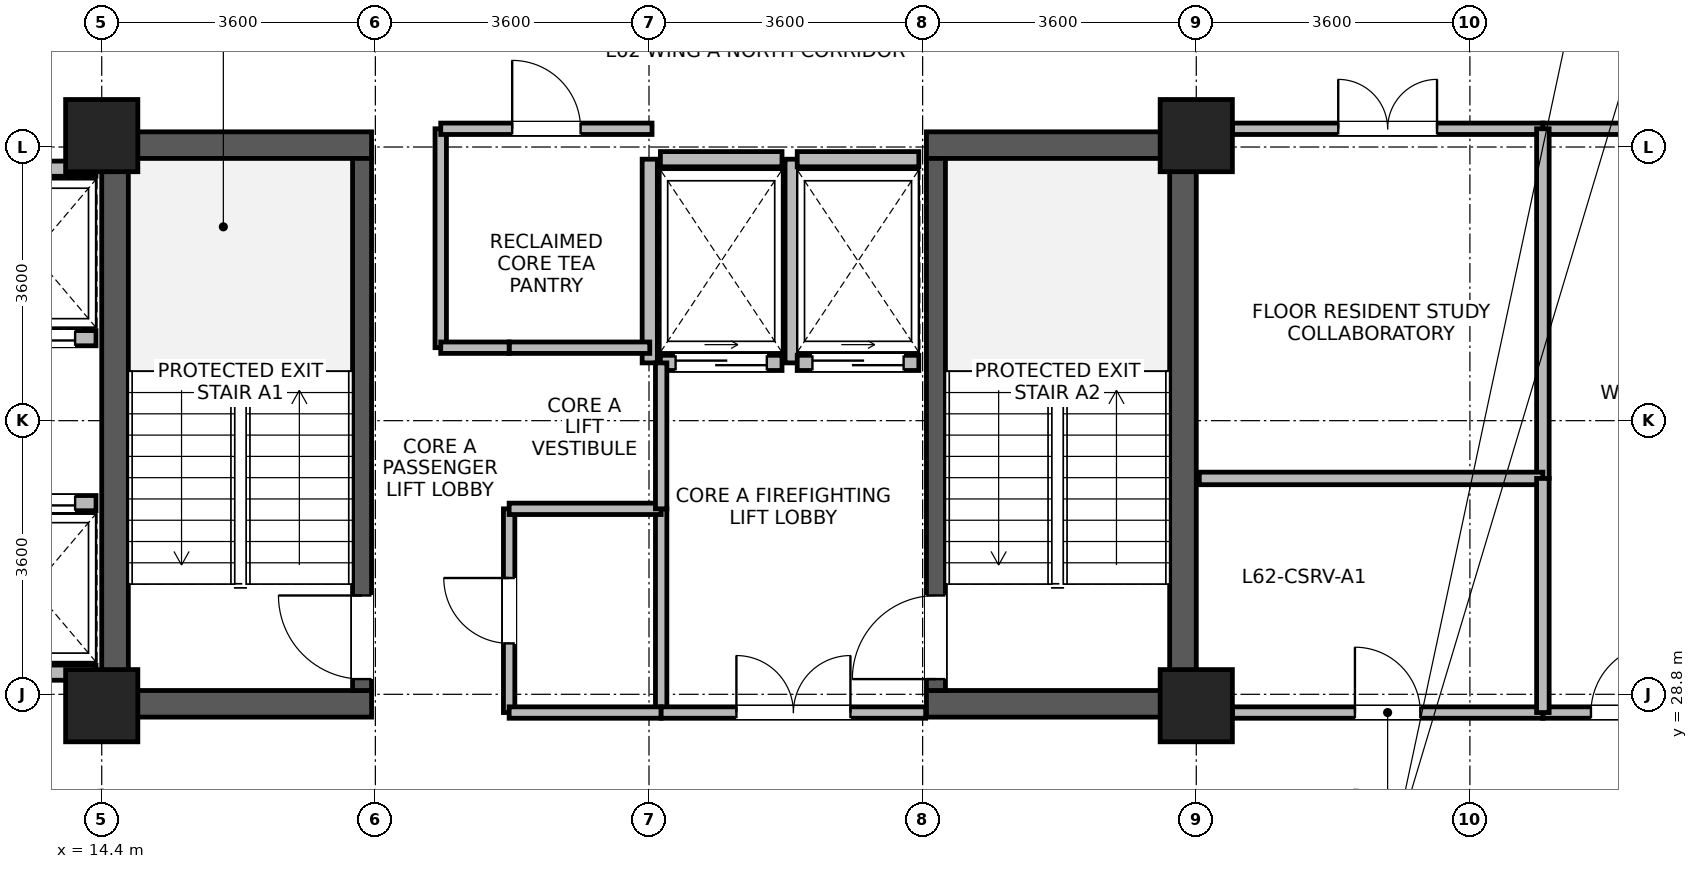
"""IFC4 building model, lengths in metres.
Left out: names, types, materials, properties, quantities, classifications, styles, units other than length and angle.
Written with IfcOpenShell. Run it as: python <this file> out.ifc"""

import sys

from ifc_helpers import new_model, si_unit, direction, frame, frame_2d, origin, origin_2d, place, context, subcontext, project, spatial, rectangle, extrude, source, transform, mapped, element, fill, save


model = new_model("IFC4")
c1 = context("Model", 3, precision=1e-05, world=origin(), true_north=direction((0.0, 1.0)))
c2 = subcontext(c1, "Body", "Model", "MODEL_VIEW")
j1 = project(units=[si_unit("LENGTHUNIT", "METRE"), si_unit("PLANEANGLEUNIT", "RADIAN")], contexts=[c1])
p1 = place(None, origin())
s1 = spatial("IfcSite", under=j1, at=p1, CompositionType="ELEMENT")
p2 = place(p1, origin())
s2 = spatial("IfcBuilding", under=s1, at=p2, CompositionType="ELEMENT")
p3 = place(p2, frame((0.0, 0.0, 242.5)))
s3 = spatial("IfcBuildingStorey", under=s2, at=p3, CompositionType="ELEMENT", Elevation=242.5)
for number, where, z_axis, x_axis in (
    (1, (14.575, 28.5, 0.0), (0.0, 0.0, 1.0), (0.0, 1.0, 0.0)),
    (2, (28.625, 28.5, 0.0), (0.0, 0.0, 1.0), (0.0, 1.0, 0.0)),
):
    element("IfcWall", number, at=place(p3, frame(where, z_axis=z_axis, x_axis=x_axis)), inside=s3, PredefinedType="SHEAR", context=c2, shape_type="SweptSolid", body=[
        extrude(rectangle(XDim=7.7, YDim=0.35, at=frame_2d((3.85, 0.0))), origin(), (0.0, 0.0, 1.0), 3.44),
    ])
for number, where, z_axis, x_axis in (
    (3, (14.75, 28.675, 0.0), (0.0, 0.0, 1.0), (1.0, 0.0, 0.0)),
    (4, (25.25, 28.675, 0.0), (0.0, 0.0, 1.0), (1.0, 0.0, 0.0)),
    (5, (14.75, 36.025, 0.0), (0.0, 0.0, 1.0), (1.0, 0.0, 0.0)),
    (6, (25.25, 36.025, 0.0), (0.0, 0.0, 1.0), (1.0, 0.0, 0.0)),
):
    element("IfcWall", number, at=place(p3, frame(where, z_axis=z_axis, x_axis=x_axis)), inside=s3, PredefinedType="SHEAR", context=c2, shape_type="SweptSolid", body=[
        extrude(rectangle(XDim=3.2, YDim=0.35, at=frame_2d((1.6, 0.0))), origin(), (0.0, 0.0, 1.0), 3.44),
    ])
p4 = place(p3, frame((17.825, 28.85, 0.0), z_axis=(0.0, 0.0, 1.0), x_axis=(0.0, 1.0, 0.0)))
e7 = element("IfcWall", 7, at=p4, inside=s3, PredefinedType="SHEAR", context=c2, shape_type="SweptSolid", body=[
    extrude(rectangle(XDim=7.0, YDim=0.25, at=frame_2d((3.5, 0.0))), origin(), (0.0, 0.0, 1.0), 3.44),
])
p5 = place(p4, frame((0.15, 0.0, 0.0)))
e8 = element("IfcOpeningElement", 8, at=p5, cuts=e7, PredefinedType="OPENING", context=c2, shape_type="SweptSolid", body=[
    extrude(rectangle(XDim=1.1, YDim=2.08, at=frame_2d((0.55, 1.04))), frame((0.0, 0.135, 0.0), z_axis=(0.0, -1.0, 0.0), x_axis=(1.0, 0.0, 0.0)), (0.0, 0.0, 1.0), 0.27),
])
p6 = place(p3, frame((25.375, 28.85, 0.0), z_axis=(0.0, 0.0, 1.0), x_axis=(0.0, 1.0, 0.0)))
e9 = element("IfcWall", 9, at=p6, inside=s3, PredefinedType="SHEAR", context=c2, shape_type="SweptSolid", body=[
    extrude(rectangle(XDim=7.0, YDim=0.25, at=frame_2d((3.5, 0.0))), origin(), (0.0, 0.0, 1.0), 3.44),
])
p7 = place(p6, frame((0.15, 0.0, 0.0)))
e10 = element("IfcOpeningElement", 10, at=p7, cuts=e9, PredefinedType="OPENING", context=c2, shape_type="SweptSolid", body=[
    extrude(rectangle(XDim=1.1, YDim=2.08, at=frame_2d((0.55, 1.04))), frame((0.0, 0.135, 0.0), z_axis=(0.0, -1.0, 0.0), x_axis=(1.0, 0.0, 0.0)), (0.0, 0.0, 1.0), 0.27),
])
m1 = source(origin(), c2, "Body", "SweptSolid", [
    extrude(rectangle(XDim=0.95, YDim=0.95, at=origin_2d()), origin(), (0.0, 0.0, 1.0), 3.7),
])
for number, where, z_axis, x_axis in (
    (11, (14.4, 28.65, 0.0), (0.0, 0.0, 1.0), (1.0, 0.0, 0.0)),
    (12, (14.4, 36.15, 0.0), (0.0, 0.0, 1.0), (1.0, 0.0, 0.0)),
    (13, (28.8, 28.65, 0.0), (0.0, 0.0, 1.0), (1.0, 0.0, 0.0)),
    (14, (28.8, 36.15, 0.0), (0.0, 0.0, 1.0), (1.0, 0.0, 0.0)),
):
    element("IfcColumn", number, at=place(p3, frame(where, z_axis=z_axis, x_axis=x_axis)), inside=s3, PredefinedType="COLUMN", context=c2, shape_type="MappedRepresentation", body=[
        mapped(m1, transform((0.0, 0.0, 0.0), x_axis=(1.0, 0.0, 0.0), y_axis=(0.0, 1.0, 0.0), z_axis=(0.0, 0.0, 1.0), scale=1.0)),
    ])
p8 = place(p3, frame((12.675, 33.485, 0.0), z_axis=(0.0, 0.0, 1.0), x_axis=(1.0, 0.0, 0.0)))
e15 = element("IfcWall", 15, at=p8, inside=s3, PredefinedType="PARTITIONING", context=c2, shape_type="SweptSolid", body=[
    extrude(rectangle(XDim=1.65, YDim=0.2, at=frame_2d((0.825, 0.0))), origin(), (0.0, 0.0, 1.0), 3.42),
])
p9 = place(p8, frame((0.275, 0.0, 0.0)))
e16 = element("IfcOpeningElement", 16, at=p9, cuts=e15, PredefinedType="OPENING", context=c2, shape_type="SweptSolid", body=[
    extrude(rectangle(XDim=1.1, YDim=2.12, at=frame_2d((0.55, 1.06))), frame((0.0, 0.11, 0.0), z_axis=(0.0, -1.0, 0.0), x_axis=(1.0, 0.0, 0.0)), (0.0, 0.0, 1.0), 0.22),
])
for number, where, z_axis, x_axis in (
    (17, (12.675, 35.715, 0.0), (0.0, 0.0, 1.0), (1.0, 0.0, 0.0)),
    (18, (12.675, 29.085, 0.0), (0.0, 0.0, 1.0), (1.0, 0.0, 0.0)),
):
    element("IfcWall", number, at=place(p3, frame(where, z_axis=z_axis, x_axis=x_axis)), inside=s3, PredefinedType="PARTITIONING", context=c2, shape_type="SweptSolid", body=[
        extrude(rectangle(XDim=1.65, YDim=0.2, at=frame_2d((0.825, 0.0))), origin(), (0.0, 0.0, 1.0), 3.42),
    ])
p10 = place(p3, frame((12.675, 31.315, 0.0), z_axis=(0.0, 0.0, 1.0), x_axis=(1.0, 0.0, 0.0)))
e19 = element("IfcWall", 19, at=p10, inside=s3, PredefinedType="PARTITIONING", context=c2, shape_type="SweptSolid", body=[
    extrude(rectangle(XDim=1.65, YDim=0.2, at=frame_2d((0.825, 0.0))), origin(), (0.0, 0.0, 1.0), 3.42),
])
p11 = place(p10, frame((0.275, 0.0, 0.0)))
e20 = element("IfcOpeningElement", 20, at=p11, cuts=e19, PredefinedType="OPENING", context=c2, shape_type="SweptSolid", body=[
    extrude(rectangle(XDim=1.1, YDim=2.12, at=frame_2d((0.55, 1.06))), frame((0.0, 0.11, 0.0), z_axis=(0.0, -1.0, 0.0), x_axis=(1.0, 0.0, 0.0)), (0.0, 0.0, 1.0), 0.22),
])
p12 = place(p3, frame((21.75, 33.16, 0.0), z_axis=(0.0, 0.0, 1.0), x_axis=(1.0, 0.0, 0.0)))
e21 = element("IfcWall", 21, at=p12, inside=s3, PredefinedType="PARTITIONING", context=c2, shape_type="SweptSolid", body=[
    extrude(rectangle(XDim=1.6, YDim=0.2, at=frame_2d((0.8, 0.0))), origin(), (0.0, 0.0, 1.0), 3.42),
])
p13 = place(p12, frame((0.2, 0.0, 0.0)))
e22 = element("IfcOpeningElement", 22, at=p13, cuts=e21, PredefinedType="OPENING", context=c2, shape_type="SweptSolid", body=[
    extrude(rectangle(XDim=1.2, YDim=2.12, at=frame_2d((0.6, 1.06))), frame((0.0, 0.11, 0.0), z_axis=(0.0, -1.0, 0.0), x_axis=(1.0, 0.0, 0.0)), (0.0, 0.0, 1.0), 0.22),
])
p14 = place(p3, frame((21.75, 35.84, 0.0), z_axis=(0.0, 0.0, 1.0), x_axis=(1.0, 0.0, 0.0)))
e23 = element("IfcWall", 23, at=p14, inside=s3, PredefinedType="PARTITIONING", context=c2, shape_type="SweptSolid", body=[
    extrude(rectangle(XDim=1.6, YDim=0.2, at=frame_2d((0.8, 0.0))), origin(), (0.0, 0.0, 1.0), 2.52),
])
for number, where, z_axis, x_axis in (
    (24, (21.61, 33.16, 0.0), (0.0, 0.0, 1.0), (0.0, 1.0, 0.0)),
    (25, (23.49, 33.16, 0.0), (0.0, 0.0, 1.0), (0.0, 1.0, 0.0)),
):
    element("IfcWall", number, at=place(p3, frame(where, z_axis=z_axis, x_axis=x_axis)), inside=s3, PredefinedType="PARTITIONING", context=c2, shape_type="SweptSolid", body=[
        extrude(rectangle(XDim=2.68, YDim=0.2, at=frame_2d((1.34, 0.0))), origin(), (0.0, 0.0, 1.0), 3.42),
    ])
p15 = place(p3, frame((23.55, 33.16, 0.0), z_axis=(0.0, 0.0, 1.0), x_axis=(1.0, 0.0, 0.0)))
e26 = element("IfcWall", 26, at=p15, inside=s3, PredefinedType="PARTITIONING", context=c2, shape_type="SweptSolid", body=[
    extrude(rectangle(XDim=1.6, YDim=0.2, at=frame_2d((0.8, 0.0))), origin(), (0.0, 0.0, 1.0), 3.42),
])
p16 = place(p15, frame((0.2, 0.0, 0.0)))
e27 = element("IfcOpeningElement", 27, at=p16, cuts=e26, PredefinedType="OPENING", context=c2, shape_type="SweptSolid", body=[
    extrude(rectangle(XDim=1.2, YDim=2.12, at=frame_2d((0.6, 1.06))), frame((0.0, 0.11, 0.0), z_axis=(0.0, -1.0, 0.0), x_axis=(1.0, 0.0, 0.0)), (0.0, 0.0, 1.0), 0.22),
])
p17 = place(p3, frame((23.55, 35.84, 0.0), z_axis=(0.0, 0.0, 1.0), x_axis=(1.0, 0.0, 0.0)))
e28 = element("IfcWall", 28, at=p17, inside=s3, PredefinedType="PARTITIONING", context=c2, shape_type="SweptSolid", body=[
    extrude(rectangle(XDim=1.6, YDim=0.2, at=frame_2d((0.8, 0.0))), origin(), (0.0, 0.0, 1.0), 2.52),
])
p18 = place(p3, frame((33.36, 28.56, 0.0), z_axis=(0.0, 0.0, 1.0), x_axis=(1.0, 0.0, 0.0)))
e29 = element("IfcWall", 29, at=p18, inside=s3, PredefinedType="PARTITIONING", context=c2, shape_type="SweptSolid", body=[
    extrude(rectangle(XDim=2.165, YDim=0.15, at=frame_2d((1.083, 0.0))), origin(), (0.0, 0.0, 1.0), 2.87),
])
p19 = place(p18, frame((0.633, 0.0, 0.0)))
e30 = element("IfcOpeningElement", 30, at=p19, cuts=e29, PredefinedType="OPENING", context=c2, shape_type="SweptSolid", body=[
    extrude(rectangle(XDim=0.9, YDim=2.08, at=frame_2d((0.45, 1.04))), frame((0.0, 0.085, 0.0), z_axis=(0.0, -1.0, 0.0), x_axis=(1.0, 0.0, 0.0)), (0.0, 0.0, 1.0), 0.17),
])
p20 = place(p3, frame((33.36, 36.24, 0.0), z_axis=(0.0, 0.0, 1.0), x_axis=(1.0, 0.0, 0.0)))
e31 = element("IfcWall", 31, at=p20, inside=s3, PredefinedType="PARTITIONING", context=c2, shape_type="SweptSolid", body=[
    extrude(rectangle(XDim=2.165, YDim=0.15, at=frame_2d((1.083, 0.0))), origin(), (0.0, 0.0, 1.0), 2.87),
])
p21 = place(p3, frame((29.275, 28.56, 0.0), z_axis=(0.0, 0.0, 1.0), x_axis=(1.0, 0.0, 0.0)))
e32 = element("IfcWall", 32, at=p21, inside=s3, PredefinedType="PARTITIONING", context=c2, shape_type="SweptSolid", body=[
    extrude(rectangle(XDim=4.085, YDim=0.15, at=frame_2d((2.042, 0.0))), origin(), (0.0, 0.0, 1.0), 2.87),
])
p22 = place(p21, frame((1.613, 0.0, 0.0)))
e33 = element("IfcOpeningElement", 33, at=p22, cuts=e32, PredefinedType="OPENING", context=c2, shape_type="SweptSolid", body=[
    extrude(rectangle(XDim=0.86, YDim=2.02, at=frame_2d((0.43, 1.01))), frame((0.0, 0.085, 0.0), z_axis=(0.0, -1.0, 0.0), x_axis=(1.0, 0.0, 0.0)), (0.0, 0.0, 1.0), 0.17),
])
p23 = place(p3, frame((29.275, 36.24, 0.0), z_axis=(0.0, 0.0, 1.0), x_axis=(1.0, 0.0, 0.0)))
e34 = element("IfcWall", 34, at=p23, inside=s3, PredefinedType="PARTITIONING", context=c2, shape_type="SweptSolid", body=[
    extrude(rectangle(XDim=4.085, YDim=0.15, at=frame_2d((2.042, 0.0))), origin(), (0.0, 0.0, 1.0), 2.87),
])
p24 = place(p23, frame((1.393, 0.0, 0.0)))
e35 = element("IfcOpeningElement", 35, at=p24, cuts=e34, PredefinedType="OPENING", context=c2, shape_type="SweptSolid", body=[
    extrude(rectangle(XDim=1.3, YDim=2.12, at=frame_2d((0.65, 1.06))), frame((0.0, 0.085, 0.0), z_axis=(0.0, -1.0, 0.0), x_axis=(1.0, 0.0, 0.0)), (0.0, 0.0, 1.0), 0.17),
])
p25 = place(p3, frame((18.86, 33.36, 0.0), z_axis=(0.0, 0.0, 1.0), x_axis=(0.0, 1.0, 0.0)))
e36 = element("IfcWall", 36, at=p25, inside=s3, PredefinedType="PARTITIONING", context=c2, shape_type="SweptSolid", body=[
    extrude(rectangle(XDim=2.88, YDim=0.15, at=frame_2d((1.44, 0.0))), origin(), (0.0, 0.0, 1.0), 3.42),
])
p26 = place(p3, frame((18.86, 36.24, 0.0), z_axis=(0.0, 0.0, 1.0), x_axis=(1.0, 0.0, 0.0)))
e37 = element("IfcWall", 37, at=p26, inside=s3, PredefinedType="PARTITIONING", context=c2, shape_type="SweptSolid", body=[
    extrude(rectangle(XDim=2.78, YDim=0.15, at=frame_2d((1.39, 0.0))), origin(), (0.0, 0.0, 1.0), 2.52),
])
p27 = place(p26, frame((0.94, 0.0, 0.0)))
e38 = element("IfcOpeningElement", 38, at=p27, cuts=e37, PredefinedType="OPENING", context=c2, shape_type="SweptSolid", body=[
    extrude(rectangle(XDim=0.9, YDim=2.08, at=frame_2d((0.45, 1.04))), frame((0.0, 0.085, 0.0), z_axis=(0.0, -1.0, 0.0), x_axis=(1.0, 0.0, 0.0)), (0.0, 0.0, 1.0), 0.17),
])
p28 = place(p3, frame((19.76, 28.56, 0.0), z_axis=(0.0, 0.0, 1.0), x_axis=(0.0, 1.0, 0.0)))
e39 = element("IfcWall", 39, at=p28, inside=s3, PredefinedType="PARTITIONING", context=c2, shape_type="SweptSolid", body=[
    extrude(rectangle(XDim=2.68, YDim=0.15, at=frame_2d((1.34, 0.0))), origin(), (0.0, 0.0, 1.0), 3.42),
])
p29 = place(p28, frame((0.91, 0.0, 0.0)))
e40 = element("IfcOpeningElement", 40, at=p29, cuts=e39, PredefinedType="OPENING", context=c2, shape_type="SweptSolid", body=[
    extrude(rectangle(XDim=0.86, YDim=2.02, at=frame_2d((0.43, 1.01))), frame((0.0, 0.085, 0.0), z_axis=(0.0, -1.0, 0.0), x_axis=(1.0, 0.0, 0.0)), (0.0, 0.0, 1.0), 0.17),
])
p30 = place(p3, frame((21.76, 28.56, 0.0), z_axis=(0.0, 0.0, 1.0), x_axis=(0.0, 1.0, 0.0)))
e41 = element("IfcWall", 41, at=p30, inside=s3, PredefinedType="PARTITIONING", context=c2, shape_type="SweptSolid", body=[
    extrude(rectangle(XDim=2.68, YDim=0.15, at=frame_2d((1.34, 0.0))), origin(), (0.0, 0.0, 1.0), 3.42),
])
p31 = place(p3, frame((19.76, 28.56, 0.0), z_axis=(0.0, 0.0, 1.0), x_axis=(1.0, 0.0, 0.0)))
e42 = element("IfcWall", 42, at=p31, inside=s3, PredefinedType="PARTITIONING", context=c2, shape_type="SweptSolid", body=[
    extrude(rectangle(XDim=2.0, YDim=0.15, at=frame_2d((1.0, 0.0))), origin(), (0.0, 0.0, 1.0), 2.52),
])
p32 = place(p3, frame((19.76, 31.24, 0.0), z_axis=(0.0, 0.0, 1.0), x_axis=(1.0, 0.0, 0.0)))
e43 = element("IfcWall", 43, at=p32, inside=s3, PredefinedType="PARTITIONING", context=c2, shape_type="SweptSolid", body=[
    extrude(rectangle(XDim=2.0, YDim=0.15, at=frame_2d((1.0, 0.0))), origin(), (0.0, 0.0, 1.0), 3.42),
])
p33 = place(p3, frame((19.76, 33.36, 0.0), z_axis=(0.0, 0.0, 1.0), x_axis=(1.0, 0.0, 0.0)))
e44 = element("IfcWall", 44, at=p33, inside=s3, PredefinedType="PARTITIONING", context=c2, shape_type="SweptSolid", body=[
    extrude(rectangle(XDim=1.85, YDim=0.15, at=frame_2d((0.925, 0.0))), origin(), (0.0, 0.0, 1.0), 3.42),
])
p34 = place(p3, frame((18.86, 33.36, 0.0), z_axis=(0.0, 0.0, 1.0), x_axis=(1.0, 0.0, 0.0)))
e45 = element("IfcWall", 45, at=p34, inside=s3, PredefinedType="PARTITIONING", context=c2, shape_type="SweptSolid", body=[
    extrude(rectangle(XDim=0.9, YDim=0.15, at=frame_2d((0.45, 0.0))), origin(), (0.0, 0.0, 1.0), 3.42),
])
p35 = place(p3, frame((33.36, 31.64, 0.0), z_axis=(0.0, 0.0, 1.0), x_axis=(0.0, 1.0, 0.0)))
e46 = element("IfcWall", 46, at=p35, inside=s3, PredefinedType="PARTITIONING", context=c2, shape_type="SweptSolid", body=[
    extrude(rectangle(XDim=4.6, YDim=0.165, at=frame_2d((2.3, 0.0))), origin(), (0.0, 0.0, 1.0), 3.42),
])
p36 = place(p3, frame((28.84, 31.64, 0.0), z_axis=(0.0, 0.0, 1.0), x_axis=(1.0, 0.0, 0.0)))
e47 = element("IfcWall", 47, at=p36, inside=s3, PredefinedType="PARTITIONING", context=c2, shape_type="SweptSolid", body=[
    extrude(rectangle(XDim=4.52, YDim=0.165, at=frame_2d((2.26, 0.0))), origin(), (0.0, 0.0, 1.0), 3.42),
])
p37 = place(p3, frame((21.76, 28.56, 0.0), z_axis=(0.0, 0.0, 1.0), x_axis=(1.0, 0.0, 0.0)))
e48 = element("IfcWall", 48, at=p37, inside=s3, PredefinedType="PARTITIONING", context=c2, shape_type="SweptSolid", body=[
    extrude(rectangle(XDim=3.48, YDim=0.15, at=frame_2d((1.74, 0.0))), origin(), (0.0, 0.0, 1.0), 2.52),
])
p38 = place(p37, frame((0.99, 0.0, 0.0)))
e49 = element("IfcOpeningElement", 49, at=p38, cuts=e48, PredefinedType="OPENING", context=c2, shape_type="SweptSolid", body=[
    extrude(rectangle(XDim=1.5, YDim=2.1, at=frame_2d((0.75, 1.05))), frame((0.0, 0.085, 0.0), z_axis=(0.0, -1.0, 0.0), x_axis=(1.0, 0.0, 0.0)), (0.0, 0.0, 1.0), 0.17),
])
p39 = place(p3, frame((33.36, 28.56, 0.0), z_axis=(0.0, 0.0, 1.0), x_axis=(0.0, 1.0, 0.0)))
e50 = element("IfcWall", 50, at=p39, inside=s3, PredefinedType="PARTITIONING", context=c2, shape_type="SweptSolid", body=[
    extrude(rectangle(XDim=3.08, YDim=0.165, at=frame_2d((1.54, 0.0))), origin(), (0.0, 0.0, 1.0), 3.42),
])
p40 = place(p3, frame((21.76, 31.24, 0.0), z_axis=(0.0, 0.0, 1.0), x_axis=(0.0, 1.0, 0.0)))
e51 = element("IfcWall", 51, at=p40, inside=s3, PredefinedType="PARTITIONING", context=c2, shape_type="SweptSolid", body=[
    extrude(rectangle(XDim=1.92, YDim=0.15, at=frame_2d((0.96, 0.0))), origin(), (0.0, 0.0, 1.0), 3.42),
])
p41 = place(p5, origin())
e52 = element("IfcDoor", 52, at=p41, inside=s3, OperationType="SINGLE_SWING_RIGHT", PredefinedType="DOOR", context=c2, shape_type="SweptSolid", body=[
    extrude(rectangle(XDim=1.1, YDim=2.08, at=frame_2d((0.55, 1.04))), frame((0.0, 0.025, 0.0), z_axis=(0.0, -1.0, 0.0), x_axis=(1.0, 0.0, 0.0)), (0.0, 0.0, 1.0), 0.05),
])
fill(e8, e52)
p42 = place(p7, origin())
e53 = element("IfcDoor", 53, at=p42, inside=s3, OperationType="SINGLE_SWING_LEFT", PredefinedType="DOOR", context=c2, shape_type="SweptSolid", body=[
    extrude(rectangle(XDim=1.1, YDim=2.08, at=frame_2d((0.55, 1.04))), frame((0.0, 0.025, 0.0), z_axis=(0.0, -1.0, 0.0), x_axis=(1.0, 0.0, 0.0)), (0.0, 0.0, 1.0), 0.05),
])
fill(e10, e53)
p43 = place(p9, origin())
e54 = element("IfcDoor", 54, at=p43, inside=s3, OperationType="SLIDING_TO_LEFT", PredefinedType="DOOR", context=c2, shape_type="SweptSolid", body=[
    extrude(rectangle(XDim=1.1, YDim=2.12, at=frame_2d((0.55, 1.06))), frame((0.0, 0.025, 0.0), z_axis=(0.0, -1.0, 0.0), x_axis=(1.0, 0.0, 0.0)), (0.0, 0.0, 1.0), 0.05),
])
fill(e16, e54)
p44 = place(p11, origin())
e55 = element("IfcDoor", 55, at=p44, inside=s3, OperationType="SLIDING_TO_LEFT", PredefinedType="DOOR", context=c2, shape_type="SweptSolid", body=[
    extrude(rectangle(XDim=1.1, YDim=2.12, at=frame_2d((0.55, 1.06))), frame((0.0, 0.025, 0.0), z_axis=(0.0, -1.0, 0.0), x_axis=(1.0, 0.0, 0.0)), (0.0, 0.0, 1.0), 0.05),
])
fill(e20, e55)
p45 = place(p13, origin())
e56 = element("IfcDoor", 56, at=p45, inside=s3, OperationType="SLIDING_TO_RIGHT", PredefinedType="DOOR", context=c2, shape_type="SweptSolid", body=[
    extrude(rectangle(XDim=1.2, YDim=2.12, at=frame_2d((0.6, 1.06))), frame((0.0, 0.025, 0.0), z_axis=(0.0, -1.0, 0.0), x_axis=(1.0, 0.0, 0.0)), (0.0, 0.0, 1.0), 0.05),
])
fill(e22, e56)
p46 = place(p16, origin())
e57 = element("IfcDoor", 57, at=p46, inside=s3, OperationType="SLIDING_TO_RIGHT", PredefinedType="DOOR", context=c2, shape_type="SweptSolid", body=[
    extrude(rectangle(XDim=1.2, YDim=2.12, at=frame_2d((0.6, 1.06))), frame((0.0, 0.025, 0.0), z_axis=(0.0, -1.0, 0.0), x_axis=(1.0, 0.0, 0.0)), (0.0, 0.0, 1.0), 0.05),
])
fill(e27, e57)
p47 = place(p19, origin())
e58 = element("IfcDoor", 58, at=p47, inside=s3, OperationType="SINGLE_SWING_RIGHT", PredefinedType="DOOR", context=c2, shape_type="SweptSolid", body=[
    extrude(rectangle(XDim=0.9, YDim=2.08, at=frame_2d((0.45, 1.04))), frame((0.0, 0.025, 0.0), z_axis=(0.0, -1.0, 0.0), x_axis=(1.0, 0.0, 0.0)), (0.0, 0.0, 1.0), 0.05),
])
fill(e30, e58)
p48 = place(p22, origin())
e59 = element("IfcDoor", 59, at=p48, inside=s3, OperationType="SINGLE_SWING_LEFT", PredefinedType="DOOR", context=c2, shape_type="SweptSolid", body=[
    extrude(rectangle(XDim=0.86, YDim=2.02, at=frame_2d((0.43, 1.01))), frame((0.0, 0.025, 0.0), z_axis=(0.0, -1.0, 0.0), x_axis=(1.0, 0.0, 0.0)), (0.0, 0.0, 1.0), 0.05),
])
fill(e33, e59)
p49 = place(p24, origin())
e60 = element("IfcDoor", 60, at=p49, inside=s3, OperationType="DOUBLE_DOOR_SINGLE_SWING", PredefinedType="DOOR", context=c2, shape_type="SweptSolid", body=[
    extrude(rectangle(XDim=1.3, YDim=2.12, at=frame_2d((0.65, 1.06))), frame((0.0, 0.025, 0.0), z_axis=(0.0, -1.0, 0.0), x_axis=(1.0, 0.0, 0.0)), (0.0, 0.0, 1.0), 0.05),
])
fill(e35, e60)
p50 = place(p27, origin())
e61 = element("IfcDoor", 61, at=p50, inside=s3, OperationType="SINGLE_SWING_LEFT", PredefinedType="DOOR", context=c2, shape_type="SweptSolid", body=[
    extrude(rectangle(XDim=0.9, YDim=2.08, at=frame_2d((0.45, 1.04))), frame((0.0, 0.025, 0.0), z_axis=(0.0, -1.0, 0.0), x_axis=(1.0, 0.0, 0.0)), (0.0, 0.0, 1.0), 0.05),
])
fill(e38, e61)
p51 = place(p29, origin())
e62 = element("IfcDoor", 62, at=p51, inside=s3, OperationType="SINGLE_SWING_RIGHT", PredefinedType="DOOR", context=c2, shape_type="SweptSolid", body=[
    extrude(rectangle(XDim=0.86, YDim=2.02, at=frame_2d((0.43, 1.01))), frame((0.0, 0.025, 0.0), z_axis=(0.0, -1.0, 0.0), x_axis=(1.0, 0.0, 0.0)), (0.0, 0.0, 1.0), 0.05),
])
fill(e40, e62)
p52 = place(p38, origin())
e63 = element("IfcDoor", 63, at=p52, inside=s3, OperationType="DOUBLE_DOOR_SINGLE_SWING", PredefinedType="DOOR", context=c2, shape_type="SweptSolid", body=[
    extrude(rectangle(XDim=1.5, YDim=2.1, at=frame_2d((0.75, 1.05))), frame((0.0, 0.025, 0.0), z_axis=(0.0, -1.0, 0.0), x_axis=(1.0, 0.0, 0.0)), (0.0, 0.0, 1.0), 0.05),
])
fill(e49, e63)
save(model, sys.argv[1])
